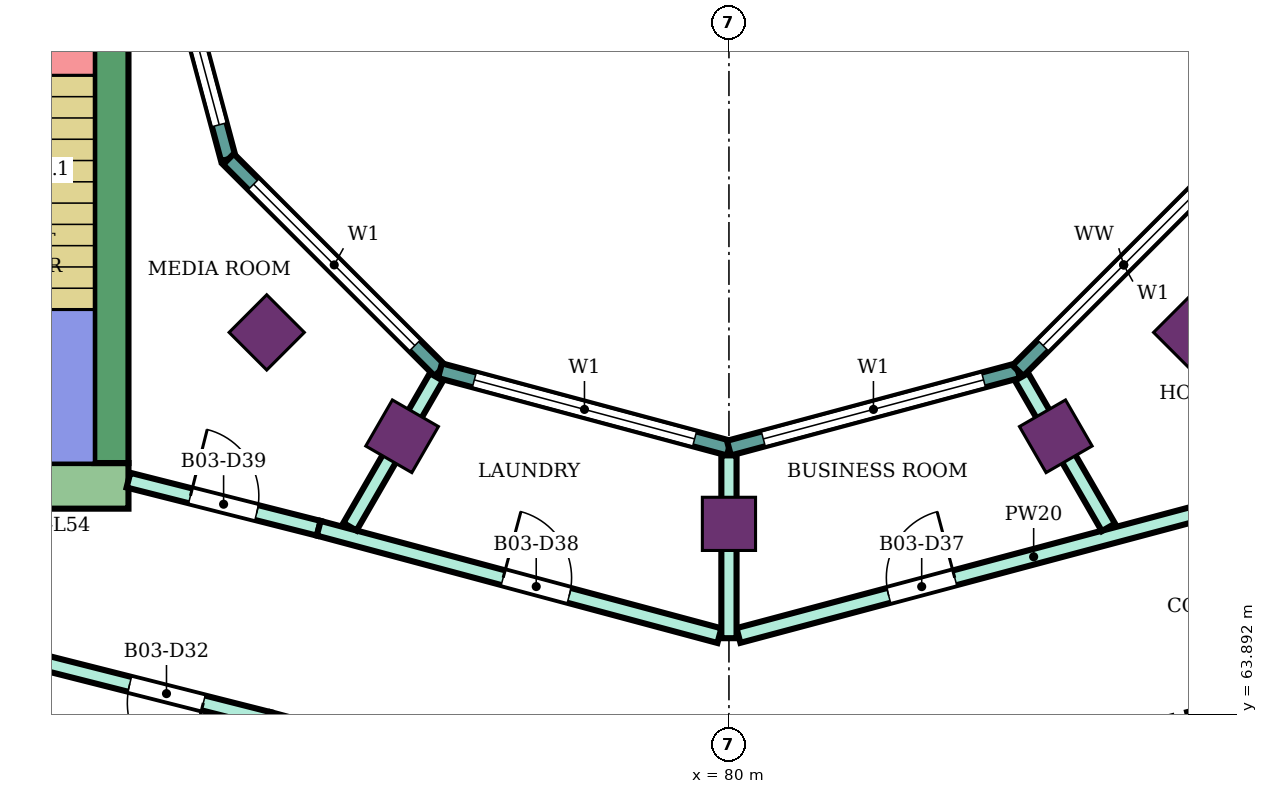
"""IFC4 building model, lengths in metres.
Left out: names, types, materials, properties, quantities, classifications, styles, units other than length and angle.
Written with IfcOpenShell. Run it as: python <this file> out.ifc"""

import sys

from ifc_helpers import new_model, si_unit, direction, frame, frame_2d, origin, origin_2d, place, context, subcontext, project, spatial, rectangle, extrude, element, fill, save


model = new_model("IFC4")
c1 = context("Model", 3, precision=1e-05, world=origin(), true_north=direction((0.0, 1.0)))
c2 = subcontext(c1, "Body", "Model", "MODEL_VIEW")
j1 = project(units=[si_unit("LENGTHUNIT", "METRE"), si_unit("PLANEANGLEUNIT", "RADIAN")], contexts=[c1])
p1 = place(None, origin())
s1 = spatial("IfcSite", under=j1, at=p1, CompositionType="ELEMENT")
p2 = place(p1, origin())
s2 = spatial("IfcBuilding", under=s1, at=p2, CompositionType="ELEMENT")
p3 = place(p2, frame((0.0, 0.0, 237.3)))
s3 = spatial("IfcBuildingStorey", under=s2, at=p3, CompositionType="ELEMENT", Elevation=237.3)
for number, where, z_axis, x_axis in (
    (1, (73.919, 68.919, 0.0), (0.0, 0.0, 1.0), (-0.707, -0.707, 0.0)),
    (2, (75.7, 67.552, 0.0), (0.0, 0.0, 1.0), (-0.5, -0.866, 0.0)),
    (3, (80.0, 66.4, 0.0), (0.0, 0.0, 1.0), (0.0, -1.0, 0.0)),
    (4, (84.3, 67.552, 0.0), (0.0, 0.0, 1.0), (0.5, -0.866, 0.0)),
    (5, (86.081, 68.919, 0.0), (0.0, 0.0, 1.0), (0.707, -0.707, 0.0)),
):
    element("IfcColumn", number, at=place(p3, frame(where, z_axis=z_axis, x_axis=x_axis)), inside=s3, PredefinedType="COLUMN", context=c2, shape_type="SweptSolid", body=[
        extrude(rectangle(XDim=0.7, YDim=0.7, at=origin_2d()), origin(), (0.0, 0.0, 1.0), 4.2),
    ])
p4 = place(p3, frame((72.1, 66.9, 0.0), z_axis=(0.0, 0.0, 1.0), x_axis=(-1.0, 0.0, 0.0)))
e6 = element("IfcWall", 6, at=p4, inside=s3, PredefinedType="SHEAR", context=c2, shape_type="SweptSolid", body=[
    extrude(rectangle(XDim=14.9, YDim=0.6, at=frame_2d((7.45, 0.0))), origin(), (0.0, 0.0, 1.0), 3.88),
])
p5 = place(p4, frame((4.2, 0.0, 0.0)))
e7 = element("IfcOpeningElement", 7, at=p5, cuts=e6, PredefinedType="OPENING", context=c2, shape_type="SweptSolid", body=[
    extrude(rectangle(XDim=2.4, YDim=2.4, at=frame_2d((1.2, 1.2))), frame((0.0, 0.31, 0.0), z_axis=(0.0, -1.0, 0.0), x_axis=(1.0, 0.0, 0.0)), (0.0, 0.0, 1.0), 0.62),
])
p6 = place(p3, frame((71.875, 75.0, 0.0), z_axis=(0.0, 0.0, 1.0), x_axis=(0.0, -1.0, 0.0)))
e8 = element("IfcWall", 8, at=p6, inside=s3, PredefinedType="SHEAR", context=c2, shape_type="SweptSolid", body=[
    extrude(rectangle(XDim=7.8, YDim=0.45, at=frame_2d((3.9, 0.0))), origin(), (0.0, 0.0, 1.0), 3.88),
])
p7 = place(p3, frame((72.396, 75.0, 0.0), z_axis=(0.0, 0.0, 1.0), x_axis=(0.258789828301, -0.965933654434, 0.0)))
e9 = element("IfcWall", 9, at=p7, inside=s3, PredefinedType="NOTDEFINED", context=c2, shape_type="SweptSolid", body=[
    extrude(rectangle(XDim=3.936, YDim=0.2, at=frame_2d((1.968, 0.0))), origin(), (0.0, 0.0, 1.0), 4.2),
])
p8 = place(p7, frame((0.468, 0.0, 0.9)))
e10 = element("IfcOpeningElement", 10, at=p8, cuts=e9, PredefinedType="OPENING", context=c2, shape_type="SweptSolid", body=[
    extrude(rectangle(XDim=3.0, YDim=2.3, at=frame_2d((1.5, 1.15))), frame((0.0, 0.11, 0.0), z_axis=(0.0, -1.0, 0.0), x_axis=(1.0, 0.0, 0.0)), (0.0, 0.0, 1.0), 0.22),
])
p9 = place(p3, frame((73.415, 71.198, 0.0), z_axis=(0.0, 0.0, 1.0), x_axis=(0.707106781187, -0.707106781187, 0.0)))
e11 = element("IfcWall", 11, at=p9, inside=s3, PredefinedType="NOTDEFINED", context=c2, shape_type="SweptSolid", body=[
    extrude(rectangle(XDim=3.936, YDim=0.2, at=frame_2d((1.968, 0.0))), origin(), (0.0, 0.0, 1.0), 4.2),
])
p10 = place(p9, frame((0.468, 0.0, 0.9)))
e12 = element("IfcOpeningElement", 12, at=p10, cuts=e11, PredefinedType="OPENING", context=c2, shape_type="SweptSolid", body=[
    extrude(rectangle(XDim=3.0, YDim=2.3, at=frame_2d((1.5, 1.15))), frame((0.0, 0.11, 0.0), z_axis=(0.0, -1.0, 0.0), x_axis=(1.0, 0.0, 0.0)), (0.0, 0.0, 1.0), 0.22),
])
p11 = place(p3, frame((76.198, 68.415, 0.0), z_axis=(0.0, 0.0, 1.0), x_axis=(0.965933654434, -0.258789828301, 0.0)))
e13 = element("IfcWall", 13, at=p11, inside=s3, PredefinedType="NOTDEFINED", context=c2, shape_type="SweptSolid", body=[
    extrude(rectangle(XDim=3.936, YDim=0.2, at=frame_2d((1.968, 0.0))), origin(), (0.0, 0.0, 1.0), 4.2),
])
p12 = place(p11, frame((0.468, 0.0, 0.9)))
e14 = element("IfcOpeningElement", 14, at=p12, cuts=e13, PredefinedType="OPENING", context=c2, shape_type="SweptSolid", body=[
    extrude(rectangle(XDim=3.0, YDim=2.3, at=frame_2d((1.5, 1.15))), frame((0.0, 0.11, 0.0), z_axis=(0.0, -1.0, 0.0), x_axis=(1.0, 0.0, 0.0)), (0.0, 0.0, 1.0), 0.22),
])
p13 = place(p3, frame((80.0, 67.396, 0.0), z_axis=(0.0, 0.0, 1.0), x_axis=(0.965933654434, 0.258789828301, 0.0)))
e15 = element("IfcWall", 15, at=p13, inside=s3, PredefinedType="NOTDEFINED", context=c2, shape_type="SweptSolid", body=[
    extrude(rectangle(XDim=3.936, YDim=0.2, at=frame_2d((1.968, 0.0))), origin(), (0.0, 0.0, 1.0), 4.2),
])
p14 = place(p13, frame((0.468, 0.0, 0.9)))
e16 = element("IfcOpeningElement", 16, at=p14, cuts=e15, PredefinedType="OPENING", context=c2, shape_type="SweptSolid", body=[
    extrude(rectangle(XDim=3.0, YDim=2.3, at=frame_2d((1.5, 1.15))), frame((0.0, 0.11, 0.0), z_axis=(0.0, -1.0, 0.0), x_axis=(1.0, 0.0, 0.0)), (0.0, 0.0, 1.0), 0.22),
])
p15 = place(p3, frame((83.802, 68.415, 0.0), z_axis=(0.0, 0.0, 1.0), x_axis=(0.707106781187, 0.707106781187, 0.0)))
e17 = element("IfcWall", 17, at=p15, inside=s3, PredefinedType="NOTDEFINED", context=c2, shape_type="SweptSolid", body=[
    extrude(rectangle(XDim=3.936, YDim=0.2, at=frame_2d((1.968, 0.0))), origin(), (0.0, 0.0, 1.0), 4.2),
])
p16 = place(p15, frame((0.468, 0.0, 0.9)))
e18 = element("IfcOpeningElement", 18, at=p16, cuts=e17, PredefinedType="OPENING", context=c2, shape_type="SweptSolid", body=[
    extrude(rectangle(XDim=3.0, YDim=2.3, at=frame_2d((1.5, 1.15))), frame((0.0, 0.11, 0.0), z_axis=(0.0, -1.0, 0.0), x_axis=(1.0, 0.0, 0.0)), (0.0, 0.0, 1.0), 0.22),
])
p17 = place(p3, frame((68.2, 65.28, 0.0), z_axis=(0.0, 0.0, 1.0), x_axis=(0.969450596516, -0.245286650503, 0.0)))
e19 = element("IfcWall", 19, at=p17, inside=s3, PredefinedType="PARTITIONING", context=c2, shape_type="SweptSolid", body=[
    extrude(rectangle(XDim=5.928, YDim=0.2, at=frame_2d((2.964, 0.0))), origin(), (0.0, 0.0, 1.0), 3.75),
])
p18 = place(p17, frame((4.039, 0.0, 0.0)))
e20 = element("IfcOpeningElement", 20, at=p18, cuts=e19, PredefinedType="OPENING", context=c2, shape_type="SweptSolid", body=[
    extrude(rectangle(XDim=1.0, YDim=2.1, at=frame_2d((0.5, 1.05))), frame((0.0, 0.11, 0.0), z_axis=(0.0, -1.0, 0.0), x_axis=(1.0, 0.0, 0.0)), (0.0, 0.0, 1.0), 0.22),
])
p19 = place(p3, frame((72.1, 66.975, 0.0), z_axis=(0.0, 0.0, 1.0), x_axis=(0.969471314457, -0.245204752086, 0.0)))
e21 = element("IfcWall", 21, at=p19, inside=s3, PredefinedType="PARTITIONING", context=c2, shape_type="SweptSolid", body=[
    extrude(rectangle(XDim=2.582, YDim=0.2, at=frame_2d((1.291, 0.0))), origin(), (0.0, 0.0, 1.0), 3.75),
])
p20 = place(p19, frame((0.841, 0.0, 0.0)))
e22 = element("IfcOpeningElement", 22, at=p20, cuts=e21, PredefinedType="OPENING", context=c2, shape_type="SweptSolid", body=[
    extrude(rectangle(XDim=0.9, YDim=2.1, at=frame_2d((0.45, 1.05))), frame((0.0, 0.11, 0.0), z_axis=(0.0, -1.0, 0.0), x_axis=(1.0, 0.0, 0.0)), (0.0, 0.0, 1.0), 0.22),
])
p21 = place(p3, frame((73.947, 63.826, 0.0), z_axis=(0.0, 0.0, 1.0), x_axis=(0.965908253407, -0.258884619088, 0.0)))
e23 = element("IfcWall", 23, at=p21, inside=s3, PredefinedType="PARTITIONING", context=c2, shape_type="SweptSolid", body=[
    extrude(rectangle(XDim=6.217, YDim=0.2, at=frame_2d((3.108, 0.0))), origin(), (0.0, 0.0, 1.0), 3.75),
])
p22 = place(p3, frame((74.603, 66.342, 0.0), z_axis=(0.0, 0.0, 1.0), x_axis=(0.965920893652, -0.258837453254, 0.0)))
e24 = element("IfcWall", 24, at=p22, inside=s3, PredefinedType="PARTITIONING", context=c2, shape_type="SweptSolid", body=[
    extrude(rectangle(XDim=5.458, YDim=0.2, at=frame_2d((2.729, 0.0))), origin(), (0.0, 0.0, 1.0), 3.75),
])
p23 = place(p22, frame((2.512, 0.0, 0.0)))
e25 = element("IfcOpeningElement", 25, at=p23, cuts=e24, PredefinedType="OPENING", context=c2, shape_type="SweptSolid", body=[
    extrude(rectangle(XDim=0.9, YDim=2.1, at=frame_2d((0.45, 1.05))), frame((0.0, 0.11, 0.0), z_axis=(0.0, -1.0, 0.0), x_axis=(1.0, 0.0, 0.0)), (0.0, 0.0, 1.0), 0.22),
])
p24 = place(p3, frame((75.014, 66.362, 0.0), z_axis=(0.0, 0.0, 1.0), x_axis=(0.500097042406, 0.865969369075, 0.0)))
e26 = element("IfcWall", 26, at=p24, inside=s3, PredefinedType="PARTITIONING", context=c2, shape_type="SweptSolid", body=[
    extrude(rectangle(XDim=2.275, YDim=0.2, at=frame_2d((1.138, 0.0))), origin(), (0.0, 0.0, 1.0), 3.75),
])
p25 = place(p3, frame((80.125, 64.932, 0.0), z_axis=(0.0, 0.0, 1.0), x_axis=(0.966236955806, 0.257655089674, 0.0)))
e27 = element("IfcWall", 27, at=p25, inside=s3, PredefinedType="PARTITIONING", context=c2, shape_type="SweptSolid", body=[
    extrude(rectangle(XDim=8.039, YDim=0.2, at=frame_2d((4.02, 0.0))), origin(), (0.0, 0.0, 1.0), 3.75),
])
p26 = place(p25, frame((6.298, 0.0, 0.0)))
e28 = element("IfcOpeningElement", 28, at=p26, cuts=e27, PredefinedType="OPENING", context=c2, shape_type="SweptSolid", body=[
    extrude(rectangle(XDim=0.9, YDim=2.1, at=frame_2d((0.45, 1.05))), frame((0.0, 0.11, 0.0), z_axis=(0.0, -1.0, 0.0), x_axis=(1.0, 0.0, 0.0)), (0.0, 0.0, 1.0), 0.22),
])
p27 = place(p25, frame((2.045, 0.0, 0.0)))
e29 = element("IfcOpeningElement", 29, at=p27, cuts=e27, PredefinedType="OPENING", context=c2, shape_type="SweptSolid", body=[
    extrude(rectangle(XDim=0.9, YDim=2.1, at=frame_2d((0.45, 1.05))), frame((0.0, 0.11, 0.0), z_axis=(0.0, -1.0, 0.0), x_axis=(1.0, 0.0, 0.0)), (0.0, 0.0, 1.0), 0.22),
])
p28 = place(p3, frame((80.0, 64.896, 0.0), z_axis=(0.0, 0.0, 1.0), x_axis=(0.0, 1.0, 0.0)))
e30 = element("IfcWall", 30, at=p28, inside=s3, PredefinedType="PARTITIONING", context=c2, shape_type="SweptSolid", body=[
    extrude(rectangle(XDim=2.405, YDim=0.2, at=frame_2d((1.203, 0.0))), origin(), (0.0, 0.0, 1.0), 3.75),
])
p29 = place(p3, frame((83.85, 68.333, 0.0), z_axis=(0.0, 0.0, 1.0), x_axis=(0.500080019051, -0.865979199835, 0.0)))
e31 = element("IfcWall", 31, at=p29, inside=s3, PredefinedType="PARTITIONING", context=c2, shape_type="SweptSolid", body=[
    extrude(rectangle(XDim=2.285, YDim=0.2, at=frame_2d((1.143, 0.0))), origin(), (0.0, 0.0, 1.0), 3.75),
])
p30 = place(p3, frame((86.053, 63.826, 0.0), z_axis=(0.0, 0.0, 1.0), x_axis=(0.969490004987, 0.245130843083, 0.0)))
e32 = element("IfcWall", 32, at=p30, inside=s3, PredefinedType="PARTITIONING", context=c2, shape_type="SweptSolid", body=[
    extrude(rectangle(XDim=5.908, YDim=0.2, at=frame_2d((2.954, 0.0))), origin(), (0.0, 0.0, 1.0), 3.75),
])
p31 = place(p8, origin())
e33 = element("IfcWindow", 33, at=p31, inside=s3, PartitioningType="SINGLE_PANEL", PredefinedType="WINDOW", context=c2, shape_type="SweptSolid", body=[
    extrude(rectangle(XDim=3.0, YDim=2.3, at=frame_2d((1.5, 1.15))), frame((0.0, 0.03, 0.0), z_axis=(0.0, -1.0, 0.0), x_axis=(1.0, 0.0, 0.0)), (0.0, 0.0, 1.0), 0.06),
])
fill(e10, e33)
p32 = place(p10, origin())
e34 = element("IfcWindow", 34, at=p32, inside=s3, PartitioningType="SINGLE_PANEL", PredefinedType="WINDOW", context=c2, shape_type="SweptSolid", body=[
    extrude(rectangle(XDim=3.0, YDim=2.3, at=frame_2d((1.5, 1.15))), frame((0.0, 0.03, 0.0), z_axis=(0.0, -1.0, 0.0), x_axis=(1.0, 0.0, 0.0)), (0.0, 0.0, 1.0), 0.06),
])
fill(e12, e34)
p33 = place(p12, origin())
e35 = element("IfcWindow", 35, at=p33, inside=s3, PartitioningType="SINGLE_PANEL", PredefinedType="WINDOW", context=c2, shape_type="SweptSolid", body=[
    extrude(rectangle(XDim=3.0, YDim=2.3, at=frame_2d((1.5, 1.15))), frame((0.0, 0.03, 0.0), z_axis=(0.0, -1.0, 0.0), x_axis=(1.0, 0.0, 0.0)), (0.0, 0.0, 1.0), 0.06),
])
fill(e14, e35)
p34 = place(p14, origin())
e36 = element("IfcWindow", 36, at=p34, inside=s3, PartitioningType="SINGLE_PANEL", PredefinedType="WINDOW", context=c2, shape_type="SweptSolid", body=[
    extrude(rectangle(XDim=3.0, YDim=2.3, at=frame_2d((1.5, 1.15))), frame((0.0, 0.03, 0.0), z_axis=(0.0, -1.0, 0.0), x_axis=(1.0, 0.0, 0.0)), (0.0, 0.0, 1.0), 0.06),
])
fill(e16, e36)
p35 = place(p16, origin())
e37 = element("IfcWindow", 37, at=p35, inside=s3, PartitioningType="SINGLE_PANEL", PredefinedType="WINDOW", context=c2, shape_type="SweptSolid", body=[
    extrude(rectangle(XDim=3.0, YDim=2.3, at=frame_2d((1.5, 1.15))), frame((0.0, 0.03, 0.0), z_axis=(0.0, -1.0, 0.0), x_axis=(1.0, 0.0, 0.0)), (0.0, 0.0, 1.0), 0.06),
])
fill(e18, e37)
p36 = place(p18, frame((1.0, 0.0, 0.0), z_axis=(0.0, 0.0, 1.0), x_axis=(-1.0, 0.0, 0.0)))
e38 = element("IfcDoor", 38, at=p36, inside=s3, OperationType="SINGLE_SWING_LEFT", PredefinedType="DOOR", context=c2, shape_type="SweptSolid", body=[
    extrude(rectangle(XDim=1.0, YDim=2.1, at=frame_2d((0.5, 1.05))), frame((0.0, 0.025, 0.0), z_axis=(0.0, -1.0, 0.0), x_axis=(1.0, 0.0, 0.0)), (0.0, 0.0, 1.0), 0.05),
])
fill(e20, e38)
p37 = place(p27, origin())
e39 = element("IfcDoor", 39, at=p37, inside=s3, OperationType="SINGLE_SWING_RIGHT", PredefinedType="DOOR", context=c2, shape_type="SweptSolid", body=[
    extrude(rectangle(XDim=0.9, YDim=2.1, at=frame_2d((0.45, 1.05))), frame((0.0, 0.025, 0.0), z_axis=(0.0, -1.0, 0.0), x_axis=(1.0, 0.0, 0.0)), (0.0, 0.0, 1.0), 0.05),
])
fill(e29, e39)
p38 = place(p23, origin())
e40 = element("IfcDoor", 40, at=p38, inside=s3, OperationType="SINGLE_SWING_LEFT", PredefinedType="DOOR", context=c2, shape_type="SweptSolid", body=[
    extrude(rectangle(XDim=0.9, YDim=2.1, at=frame_2d((0.45, 1.05))), frame((0.0, 0.025, 0.0), z_axis=(0.0, -1.0, 0.0), x_axis=(1.0, 0.0, 0.0)), (0.0, 0.0, 1.0), 0.05),
])
fill(e25, e40)
p39 = place(p20, origin())
e41 = element("IfcDoor", 41, at=p39, inside=s3, OperationType="SINGLE_SWING_LEFT", PredefinedType="DOOR", context=c2, shape_type="SweptSolid", body=[
    extrude(rectangle(XDim=0.9, YDim=2.1, at=frame_2d((0.45, 1.05))), frame((0.0, 0.025, 0.0), z_axis=(0.0, -1.0, 0.0), x_axis=(1.0, 0.0, 0.0)), (0.0, 0.0, 1.0), 0.05),
])
fill(e22, e41)
save(model, sys.argv[1])
